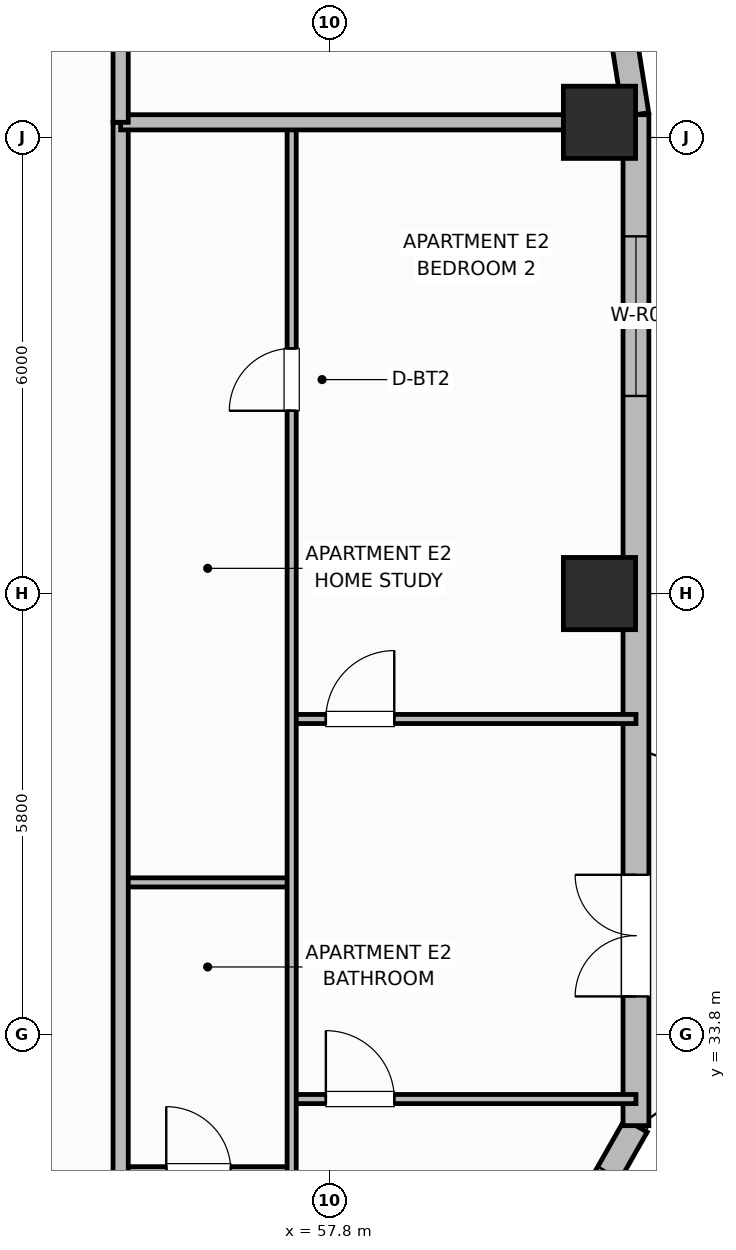
"""IFC4 building model, lengths in metres.
Left out: names, types, materials, properties, quantities, classifications, styles, units other than length and angle.
Written with IfcOpenShell. Run it as: python <this file> out.ifc"""

import sys

from ifc_helpers import new_model, si_unit, direction, frame, frame_2d, origin, origin_2d, place, context, subcontext, project, spatial, rectangle, extrude, element, fill, save


model = new_model("IFC4")
c1 = context("Model", 3, precision=1e-05, world=origin(), true_north=direction((0.0, 1.0)))
c2 = subcontext(c1, "Body", "Model", "MODEL_VIEW")
j1 = project(units=[si_unit("LENGTHUNIT", "METRE"), si_unit("PLANEANGLEUNIT", "RADIAN")], contexts=[c1])
p1 = place(None, origin())
s1 = spatial("IfcSite", under=j1, at=p1, CompositionType="ELEMENT")
p2 = place(p1, origin())
s2 = spatial("IfcBuilding", under=s1, at=p2, CompositionType="ELEMENT")
p3 = place(p2, frame((0.0, 0.0, 170.0)))
s3 = spatial("IfcBuildingStorey", under=s2, at=p3, CompositionType="ELEMENT", Elevation=170.0)
for number, where, z_axis, x_axis in (
    (1, (61.35, 39.6, 0.0), (0.0, 0.0, 1.0), (1.0, 0.0, 0.0)),
    (2, (61.35, 45.8, 0.0), (0.0, 0.0, 1.0), (1.0, 0.0, 0.0)),
):
    element("IfcColumn", number, at=place(p3, frame(where, z_axis=z_axis, x_axis=x_axis)), inside=s3, PredefinedType="COLUMN", context=c2, shape_type="SweptSolid", body=[
        extrude(rectangle(XDim=0.95, YDim=0.95, at=origin_2d()), origin(), (0.0, 0.0, 1.0), 3.7),
    ])
p4 = place(p3, frame((60.58, 30.4, 0.0), z_axis=(0.0, 0.0, 1.0), x_axis=(0.493976255291, 0.869475393101, 0.0)))
e3 = element("IfcWall", 3, at=p4, inside=s3, PredefinedType="SOLIDWALL", context=c2, shape_type="SweptSolid", body=[
    extrude(rectangle(XDim=2.531, YDim=0.34, at=frame_2d((1.265, 0.0))), origin(), (0.0, 0.0, 1.0), 2.72),
])
p5 = place(p4, frame((0.715, 0.0, 0.91)))
e4 = element("IfcOpeningElement", 4, at=p5, cuts=e3, PredefinedType="OPENING", context=c2, shape_type="SweptSolid", body=[
    extrude(rectangle(XDim=1.1, YDim=1.65, at=frame_2d((0.55, 0.825))), frame((0.0, 0.18, 0.0), z_axis=(0.0, -1.0, 0.0), x_axis=(1.0, 0.0, 0.0)), (0.0, 0.0, 1.0), 0.36),
])
p6 = place(p3, frame((61.83, 32.6, 0.0), z_axis=(0.0, 0.0, 1.0), x_axis=(0.0, 1.0, 0.0)))
e5 = element("IfcWall", 5, at=p6, inside=s3, PredefinedType="SOLIDWALL", context=c2, shape_type="SweptSolid", body=[
    extrude(rectangle(XDim=13.3, YDim=0.34, at=frame_2d((6.65, 0.0))), origin(), (0.0, 0.0, 1.0), 2.72),
])
p7 = place(p6, frame((1.7, 0.0, 0.0)))
e6 = element("IfcOpeningElement", 6, at=p7, cuts=e5, PredefinedType="OPENING", context=c2, shape_type="SweptSolid", body=[
    extrude(rectangle(XDim=1.6, YDim=2.1, at=frame_2d((0.8, 1.05))), frame((0.0, 0.18, 0.0), z_axis=(0.0, -1.0, 0.0), x_axis=(1.0, 0.0, 0.0)), (0.0, 0.0, 1.0), 0.36),
])
p8 = place(p6, frame((9.6, 0.0, 0.7)))
e7 = element("IfcOpeningElement", 7, at=p8, cuts=e5, PredefinedType="OPENING", context=c2, shape_type="SweptSolid", body=[
    extrude(rectangle(XDim=2.1, YDim=1.9, at=frame_2d((1.05, 0.95))), frame((0.0, 0.18, 0.0), z_axis=(0.0, -1.0, 0.0), x_axis=(1.0, 0.0, 0.0)), (0.0, 0.0, 1.0), 0.36),
])
p9 = place(p3, frame((61.83, 45.9, 0.0), z_axis=(0.0, 0.0, 1.0), x_axis=(-0.156481329164, 0.987680916907, 0.0)))
e8 = element("IfcWall", 8, at=p9, inside=s3, PredefinedType="SOLIDWALL", context=c2, shape_type="SweptSolid", body=[
    extrude(rectangle(XDim=1.136, YDim=0.34, at=frame_2d((0.568, 0.0))), origin(), (0.0, 0.0, 1.0), 2.72),
])
p10 = place(p3, frame((55.05, 32.0, 0.0), z_axis=(0.0, 0.0, 1.0), x_axis=(1.0, 0.0, 0.0)))
e9 = element("IfcWall", 9, at=p10, inside=s3, PredefinedType="PARTITIONING", context=c2, shape_type="SweptSolid", body=[
    extrude(rectangle(XDim=2.25, YDim=0.12, at=frame_2d((1.125, 0.0))), origin(), (0.0, 0.0, 1.0), 2.55),
])
p11 = place(p10, frame((0.6, 0.0, 0.0)))
e10 = element("IfcOpeningElement", 10, at=p11, cuts=e9, PredefinedType="OPENING", context=c2, shape_type="SweptSolid", body=[
    extrude(rectangle(XDim=0.85, YDim=2.1, at=frame_2d((0.425, 1.05))), frame((0.0, 0.07, 0.0), z_axis=(0.0, -1.0, 0.0), x_axis=(1.0, 0.0, 0.0)), (0.0, 0.0, 1.0), 0.14),
])
p12 = place(p3, frame((55.05, 35.8, 0.0), z_axis=(0.0, 0.0, 1.0), x_axis=(1.0, 0.0, 0.0)))
e11 = element("IfcWall", 11, at=p12, inside=s3, PredefinedType="PARTITIONING", context=c2, shape_type="SweptSolid", body=[
    extrude(rectangle(XDim=2.25, YDim=0.12, at=frame_2d((1.125, 0.0))), origin(), (0.0, 0.0, 1.0), 2.55),
])
p13 = place(p3, frame((57.3, 32.95, 0.0), z_axis=(0.0, 0.0, 1.0), x_axis=(1.0, 0.0, 0.0)))
e12 = element("IfcWall", 12, at=p13, inside=s3, PredefinedType="PARTITIONING", context=c2, shape_type="SweptSolid", body=[
    extrude(rectangle(XDim=4.53, YDim=0.12, at=frame_2d((2.265, 0.0))), origin(), (0.0, 0.0, 1.0), 2.55),
])
p14 = place(p13, frame((0.45, 0.0, 0.0)))
e13 = element("IfcOpeningElement", 13, at=p14, cuts=e12, PredefinedType="OPENING", context=c2, shape_type="SweptSolid", body=[
    extrude(rectangle(XDim=0.9, YDim=2.1, at=frame_2d((0.45, 1.05))), frame((0.0, 0.07, 0.0), z_axis=(0.0, -1.0, 0.0), x_axis=(1.0, 0.0, 0.0)), (0.0, 0.0, 1.0), 0.14),
])
p15 = place(p3, frame((57.3, 37.95, 0.0), z_axis=(0.0, 0.0, 1.0), x_axis=(1.0, 0.0, 0.0)))
e14 = element("IfcWall", 14, at=p15, inside=s3, PredefinedType="PARTITIONING", context=c2, shape_type="SweptSolid", body=[
    extrude(rectangle(XDim=4.53, YDim=0.12, at=frame_2d((2.265, 0.0))), origin(), (0.0, 0.0, 1.0), 2.55),
])
p16 = place(p15, frame((0.45, 0.0, 0.0)))
e15 = element("IfcOpeningElement", 15, at=p16, cuts=e14, PredefinedType="OPENING", context=c2, shape_type="SweptSolid", body=[
    extrude(rectangle(XDim=0.9, YDim=2.1, at=frame_2d((0.45, 1.05))), frame((0.0, 0.07, 0.0), z_axis=(0.0, -1.0, 0.0), x_axis=(1.0, 0.0, 0.0)), (0.0, 0.0, 1.0), 0.14),
])
p17 = place(p3, frame((57.3, 26.64, 0.0), z_axis=(0.0, 0.0, 1.0), x_axis=(0.0, 1.0, 0.0)))
e16 = element("IfcWall", 16, at=p17, inside=s3, PredefinedType="PARTITIONING", context=c2, shape_type="SweptSolid", body=[
    extrude(rectangle(XDim=19.12, YDim=0.12, at=frame_2d((9.56, 0.0))), origin(), (0.0, 0.0, 1.0), 2.55),
])
p18 = place(p17, frame((2.81, 0.0, 0.0)))
e17 = element("IfcOpeningElement", 17, at=p18, cuts=e16, PredefinedType="OPENING", context=c2, shape_type="SweptSolid", body=[
    extrude(rectangle(XDim=0.9, YDim=2.1, at=frame_2d((0.45, 1.05))), frame((0.0, 0.07, 0.0), z_axis=(0.0, -1.0, 0.0), x_axis=(1.0, 0.0, 0.0)), (0.0, 0.0, 1.0), 0.14),
])
p19 = place(p17, frame((15.365, 0.0, 0.0)))
e18 = element("IfcOpeningElement", 18, at=p19, cuts=e16, PredefinedType="OPENING", context=c2, shape_type="SweptSolid", body=[
    extrude(rectangle(XDim=0.82, YDim=2.08, at=frame_2d((0.41, 1.04))), frame((0.0, 0.07, 0.0), z_axis=(0.0, -1.0, 0.0), x_axis=(1.0, 0.0, 0.0)), (0.0, 0.0, 1.0), 0.14),
])
p20 = place(p3, frame((55.05, 10.6, 0.0), z_axis=(0.0, 0.0, 1.0), x_axis=(0.0, 1.0, 0.0)))
e19 = element("IfcWall", 19, at=p20, inside=s3, PredefinedType="PARTITIONING", context=c2, shape_type="SweptSolid", body=[
    extrude(rectangle(XDim=35.2, YDim=0.2, at=frame_2d((17.6, 0.0))), origin(), (0.0, 0.0, 1.0), 2.55),
])
p21 = place(p20, frame((2.65, 0.0, 0.0)))
e20 = element("IfcOpeningElement", 20, at=p21, cuts=e19, PredefinedType="OPENING", context=c2, shape_type="SweptSolid", body=[
    extrude(rectangle(XDim=1.0, YDim=2.15, at=frame_2d((0.5, 1.075))), frame((0.0, 0.11, 0.0), z_axis=(0.0, -1.0, 0.0), x_axis=(1.0, 0.0, 0.0)), (0.0, 0.0, 1.0), 0.22),
])
p22 = place(p20, frame((19.95, 0.0, 0.0)))
e21 = element("IfcOpeningElement", 21, at=p22, cuts=e19, PredefinedType="OPENING", context=c2, shape_type="SweptSolid", body=[
    extrude(rectangle(XDim=1.0, YDim=2.15, at=frame_2d((0.5, 1.075))), frame((0.0, 0.11, 0.0), z_axis=(0.0, -1.0, 0.0), x_axis=(1.0, 0.0, 0.0)), (0.0, 0.0, 1.0), 0.22),
])
p23 = place(p3, frame((55.05, 45.8, 0.0), z_axis=(0.0, 0.0, 1.0), x_axis=(1.0, 0.0, 0.0)))
e22 = element("IfcWall", 22, at=p23, inside=s3, PredefinedType="PARTITIONING", context=c2, shape_type="SweptSolid", body=[
    extrude(rectangle(XDim=6.36, YDim=0.2, at=frame_2d((3.18, 0.0))), origin(), (0.0, 0.0, 1.0), 2.55),
])
p24 = place(p3, frame((55.05, 45.8, 0.0), z_axis=(0.0, 0.0, 1.0), x_axis=(0.0, 1.0, 0.0)))
e23 = element("IfcWall", 23, at=p24, inside=s3, PredefinedType="PARTITIONING", context=c2, shape_type="SweptSolid", body=[
    extrude(rectangle(XDim=3.73, YDim=0.2, at=frame_2d((1.865, 0.0))), origin(), (0.0, 0.0, 1.0), 2.55),
])
p25 = place(p7, origin())
e24 = element("IfcDoor", 24, at=p25, inside=s3, OperationType="DOUBLE_DOOR_SINGLE_SWING", PredefinedType="DOOR", context=c2, shape_type="SweptSolid", body=[
    extrude(rectangle(XDim=1.6, YDim=2.1, at=frame_2d((0.8, 1.05))), frame((0.0, 0.025, 0.0), z_axis=(0.0, -1.0, 0.0), x_axis=(1.0, 0.0, 0.0)), (0.0, 0.0, 1.0), 0.05),
])
fill(e6, e24)
p26 = place(p8, origin())
e25 = element("IfcWindow", 25, at=p26, inside=s3, PartitioningType="SINGLE_PANEL", PredefinedType="WINDOW", context=c2, shape_type="SweptSolid", body=[
    extrude(rectangle(XDim=2.1, YDim=1.9, at=frame_2d((1.05, 0.95))), frame((0.0, 0.03, 0.0), z_axis=(0.0, -1.0, 0.0), x_axis=(1.0, 0.0, 0.0)), (0.0, 0.0, 1.0), 0.06),
])
fill(e7, e25)
p27 = place(p11, origin())
e26 = element("IfcDoor", 26, at=p27, inside=s3, OperationType="SINGLE_SWING_LEFT", PredefinedType="DOOR", context=c2, shape_type="SweptSolid", body=[
    extrude(rectangle(XDim=0.85, YDim=2.1, at=frame_2d((0.425, 1.05))), frame((0.0, 0.025, 0.0), z_axis=(0.0, -1.0, 0.0), x_axis=(1.0, 0.0, 0.0)), (0.0, 0.0, 1.0), 0.05),
])
fill(e10, e26)
p28 = place(p14, origin())
e27 = element("IfcDoor", 27, at=p28, inside=s3, OperationType="SINGLE_SWING_LEFT", PredefinedType="DOOR", context=c2, shape_type="SweptSolid", body=[
    extrude(rectangle(XDim=0.9, YDim=2.1, at=frame_2d((0.45, 1.05))), frame((0.0, 0.025, 0.0), z_axis=(0.0, -1.0, 0.0), x_axis=(1.0, 0.0, 0.0)), (0.0, 0.0, 1.0), 0.05),
])
fill(e13, e27)
p29 = place(p16, origin())
e28 = element("IfcDoor", 28, at=p29, inside=s3, OperationType="SINGLE_SWING_RIGHT", PredefinedType="DOOR", context=c2, shape_type="SweptSolid", body=[
    extrude(rectangle(XDim=0.9, YDim=2.1, at=frame_2d((0.45, 1.05))), frame((0.0, 0.025, 0.0), z_axis=(0.0, -1.0, 0.0), x_axis=(1.0, 0.0, 0.0)), (0.0, 0.0, 1.0), 0.05),
])
fill(e15, e28)
p30 = place(p19, origin())
e29 = element("IfcDoor", 29, at=p30, inside=s3, OperationType="SINGLE_SWING_LEFT", PredefinedType="DOOR", context=c2, shape_type="SweptSolid", body=[
    extrude(rectangle(XDim=0.82, YDim=2.08, at=frame_2d((0.41, 1.04))), frame((0.0, 0.025, 0.0), z_axis=(0.0, -1.0, 0.0), x_axis=(1.0, 0.0, 0.0)), (0.0, 0.0, 1.0), 0.05),
])
fill(e18, e29)
save(model, sys.argv[1])
